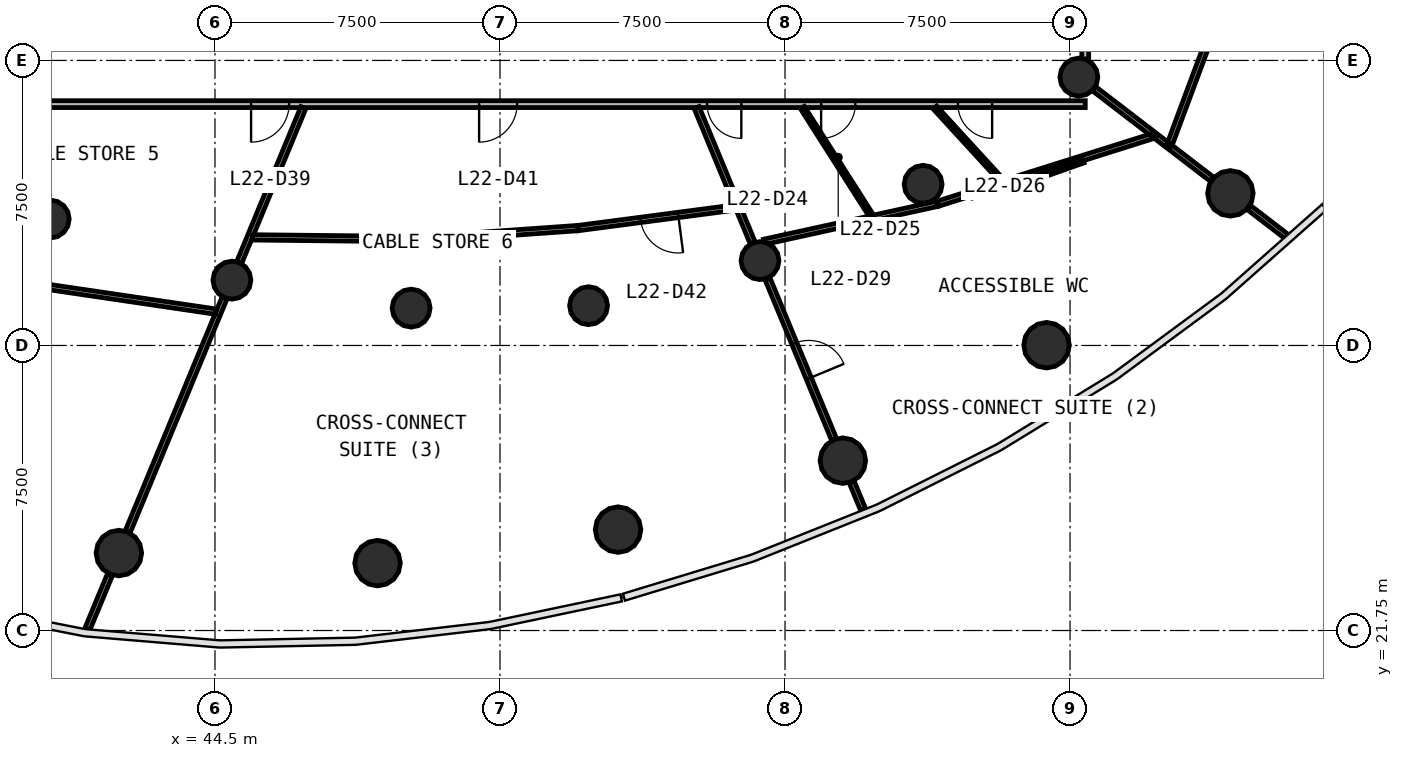
"""IFC4 building model, lengths in metres.
Left out: names, types, materials, properties, quantities, classifications, styles, units other than length and angle.
Written with IfcOpenShell. Run it as: python <this file> out.ifc"""

import sys

from ifc_helpers import new_model, si_unit, direction, frame, frame_2d, origin, origin_2d, place, context, subcontext, project, spatial, rectangle, circle, extrude, source, transform, mapped, element, fill, save


model = new_model("IFC4")
c1 = context("Model", 3, precision=1e-05, world=origin(), true_north=direction((0.0, 1.0)))
c2 = subcontext(c1, "Body", "Model", "MODEL_VIEW")
j1 = project(units=[si_unit("LENGTHUNIT", "METRE"), si_unit("PLANEANGLEUNIT", "RADIAN")], contexts=[c1])
p1 = place(None, origin())
s1 = spatial("IfcSite", under=j1, at=p1, CompositionType="ELEMENT")
p2 = place(p1, origin())
s2 = spatial("IfcBuilding", under=s1, at=p2, CompositionType="ELEMENT")
p3 = place(p2, frame((0.0, 0.0, 96.2)))
s3 = spatial("IfcBuildingStorey", under=s2, at=p3, CompositionType="ELEMENT", Elevation=96.2)
m1 = source(origin(), c2, "Body", "SweptSolid", [
    extrude(circle(Radius=0.6, at=origin_2d()), origin(), (0.0, 0.0, 1.0), 4.1),
])
for number, where, z_axis, x_axis in (
    (1, (41.971, 23.788, 0.0), (0.0, 0.0, 1.0), (1.0, 0.0, 0.0)),
    (2, (48.778, 23.523, 0.0), (0.0, 0.0, 1.0), (1.0, 0.0, 0.0)),
    (3, (55.106, 24.405, 0.0), (0.0, 0.0, 1.0), (1.0, 0.0, 0.0)),
    (4, (61.022, 26.219, 0.0), (0.0, 0.0, 1.0), (1.0, 0.0, 0.0)),
    (5, (66.382, 29.257, 0.0), (0.0, 0.0, 1.0), (1.0, 0.0, 0.0)),
    (6, (71.22, 33.252, 0.0), (0.0, 0.0, 1.0), (1.0, 0.0, 0.0)),
):
    element("IfcColumn", number, at=place(p3, frame(where, z_axis=z_axis, x_axis=x_axis)), inside=s3, PredefinedType="COLUMN", context=c2, shape_type="MappedRepresentation", body=[
        mapped(m1, transform((0.0, 0.0, 0.0), scale=1.0)),
    ])
m2 = source(origin(), c2, "Body", "SweptSolid", [
    extrude(circle(Radius=0.5, at=origin_2d()), origin(), (0.0, 0.0, 1.0), 4.1),
])
for number, where, z_axis, x_axis in (
    (7, (40.165, 32.576, 0.0), (0.0, 0.0, 1.0), (1.0, 0.0, 0.0)),
    (8, (44.945, 30.969, 0.0), (0.0, 0.0, 1.0), (1.0, 0.0, 0.0)),
    (9, (49.661, 30.233, 0.0), (0.0, 0.0, 1.0), (1.0, 0.0, 0.0)),
    (10, (54.331, 30.297, 0.0), (0.0, 0.0, 1.0), (1.0, 0.0, 0.0)),
    (11, (58.842, 31.482, 0.0), (0.0, 0.0, 1.0), (1.0, 0.0, 0.0)),
    (12, (63.134, 33.49, 0.0), (0.0, 0.0, 1.0), (1.0, 0.0, 0.0)),
    (13, (67.232, 36.312, 0.0), (0.0, 0.0, 1.0), (1.0, 0.0, 0.0)),
):
    element("IfcColumn", number, at=place(p3, frame(where, z_axis=z_axis, x_axis=x_axis)), inside=s3, PredefinedType="COLUMN", context=c2, shape_type="MappedRepresentation", body=[
        mapped(m2, transform((0.0, 0.0, 0.0), scale=1.0)),
    ])
p4 = place(p3, frame((67.4, 35.6, 0.0), z_axis=(0.0, 0.0, 1.0), x_axis=(-1.0, 0.0, 0.0)))
e14 = element("IfcWall", 14, at=p4, inside=s3, PredefinedType="PARTITIONING", context=c2, shape_type="SweptSolid", body=[
    extrude(rectangle(XDim=30.8, YDim=0.18, at=frame_2d((15.4, 0.0))), origin(), (0.0, 0.0, 1.0), 2.9),
])
p5 = place(p4, frame((9.05, 0.0, 0.0)))
e15 = element("IfcOpeningElement", 15, at=p5, cuts=e14, PredefinedType="OPENING", context=c2, shape_type="SweptSolid", body=[
    extrude(rectangle(XDim=0.9, YDim=2.1, at=frame_2d((0.45, 1.05))), frame((0.0, 0.1, 0.0), z_axis=(0.0, -1.0, 0.0), x_axis=(1.0, 0.0, 0.0)), (0.0, 0.0, 1.0), 0.2),
])
p6 = place(p4, frame((6.05, 0.0, 0.0)))
e16 = element("IfcOpeningElement", 16, at=p6, cuts=e14, PredefinedType="OPENING", context=c2, shape_type="SweptSolid", body=[
    extrude(rectangle(XDim=0.9, YDim=2.1, at=frame_2d((0.45, 1.05))), frame((0.0, 0.1, 0.0), z_axis=(0.0, -1.0, 0.0), x_axis=(1.0, 0.0, 0.0)), (0.0, 0.0, 1.0), 0.2),
])
p7 = place(p4, frame((2.45, 0.0, 0.0)))
e17 = element("IfcOpeningElement", 17, at=p7, cuts=e14, PredefinedType="OPENING", context=c2, shape_type="SweptSolid", body=[
    extrude(rectangle(XDim=0.9, YDim=2.1, at=frame_2d((0.45, 1.05))), frame((0.0, 0.1, 0.0), z_axis=(0.0, -1.0, 0.0), x_axis=(1.0, 0.0, 0.0)), (0.0, 0.0, 1.0), 0.2),
])
p8 = place(p4, frame((20.95, 0.0, 0.0)))
e18 = element("IfcOpeningElement", 18, at=p8, cuts=e14, PredefinedType="OPENING", context=c2, shape_type="SweptSolid", body=[
    extrude(rectangle(XDim=1.0, YDim=2.1, at=frame_2d((0.5, 1.05))), frame((0.0, 0.1, 0.0), z_axis=(0.0, -1.0, 0.0), x_axis=(1.0, 0.0, 0.0)), (0.0, 0.0, 1.0), 0.2),
])
p9 = place(p4, frame((14.95, 0.0, 0.0)))
e19 = element("IfcOpeningElement", 19, at=p9, cuts=e14, PredefinedType="OPENING", context=c2, shape_type="SweptSolid", body=[
    extrude(rectangle(XDim=1.0, YDim=2.1, at=frame_2d((0.5, 1.05))), frame((0.0, 0.1, 0.0), z_axis=(0.0, -1.0, 0.0), x_axis=(1.0, 0.0, 0.0)), (0.0, 0.0, 1.0), 0.2),
])
p10 = place(p3, frame((67.4, 60.37, 0.0), z_axis=(0.0, 0.0, 1.0), x_axis=(0.0, -1.0, 0.0)))
e20 = element("IfcWall", 20, at=p10, inside=s3, PredefinedType="PARTITIONING", context=c2, shape_type="SweptSolid", body=[
    extrude(rectangle(XDim=23.583, YDim=0.18, at=frame_2d((11.791, 0.0))), origin(), (0.0, 0.0, 1.0), 2.9),
])
p11 = place(p10, frame((11.333, 0.0, 0.0)))
e21 = element("IfcOpeningElement", 21, at=p11, cuts=e20, PredefinedType="OPENING", context=c2, shape_type="SweptSolid", body=[
    extrude(rectangle(XDim=1.0, YDim=2.1, at=frame_2d((0.5, 1.05))), frame((0.0, 0.1, 0.0), z_axis=(0.0, -1.0, 0.0), x_axis=(1.0, 0.0, 0.0)), (0.0, 0.0, 1.0), 0.2),
])
p12 = place(p10, frame((4.532, 0.0, 0.0)))
e22 = element("IfcOpeningElement", 22, at=p12, cuts=e20, PredefinedType="OPENING", context=c2, shape_type="SweptSolid", body=[
    extrude(rectangle(XDim=1.0, YDim=2.1, at=frame_2d((0.5, 1.05))), frame((0.0, 0.1, 0.0), z_axis=(0.0, -1.0, 0.0), x_axis=(1.0, 0.0, 0.0)), (0.0, 0.0, 1.0), 0.2),
])
p13 = place(p3, frame((42.202, 24.347, 0.0), z_axis=(0.0, 0.0, 1.0), x_axis=(0.382696989205, 0.923873916968, 0.0)))
e23 = element("IfcWall", 23, at=p13, inside=s3, PredefinedType="PARTITIONING", context=c2, shape_type="SweptSolid", body=[
    extrude(rectangle(XDim=6.663, YDim=0.14, at=frame_2d((3.332, 0.0))), origin(), (0.0, 0.0, 1.0), 2.9),
])
p14 = place(p3, frame((63.525, 32.981, 0.0), z_axis=(0.0, 0.0, 1.0), x_axis=(0.953823490885, 0.300367688402, 0.0)))
e24 = element("IfcWall", 24, at=p14, inside=s3, PredefinedType="PARTITIONING", context=c2, shape_type="SweptSolid", body=[
    extrude(rectangle(XDim=5.983, YDim=0.14, at=frame_2d((2.992, 0.0))), origin(), (0.0, 0.0, 1.0), 2.9),
])
p15 = place(p3, frame((69.604, 34.492, 0.0), z_axis=(0.0, 0.0, 1.0), x_axis=(0.349032218766, 0.937110724655, 0.0)))
e25 = element("IfcWall", 25, at=p15, inside=s3, PredefinedType="PARTITIONING", context=c2, shape_type="SweptSolid", body=[
    extrude(rectangle(XDim=5.747, YDim=0.14, at=frame_2d((2.874, 0.0))), origin(), (0.0, 0.0, 1.0), 2.9),
])
p16 = place(p3, frame((38.958, 30.96, 0.0), z_axis=(0.0, 0.0, 1.0), x_axis=(0.989308018388, -0.145841162756, 0.0)))
e26 = element("IfcWall", 26, at=p16, inside=s3, PredefinedType="PARTITIONING", context=c2, shape_type="SweptSolid", body=[
    extrude(rectangle(XDim=5.628, YDim=0.14, at=frame_2d((2.814, 0.0))), origin(), (0.0, 0.0, 1.0), 2.9),
])
p17 = place(p3, frame((58.947, 31.976, 0.0), z_axis=(0.0, 0.0, 1.0), x_axis=(0.976747556801, 0.214392654451, 0.0)))
e27 = element("IfcWall", 27, at=p17, inside=s3, PredefinedType="PARTITIONING", context=c2, shape_type="SweptSolid", body=[
    extrude(rectangle(XDim=4.656, YDim=0.14, at=frame_2d((2.328, 0.0))), origin(), (0.0, 0.0, 1.0), 2.9),
])
p18 = place(p3, frame((59.035, 31.016, 0.0), z_axis=(0.0, 0.0, 1.0), x_axis=(0.382705930348, -0.923870213221, 0.0)))
e28 = element("IfcWall", 28, at=p18, inside=s3, PredefinedType="PARTITIONING", context=c2, shape_type="SweptSolid", body=[
    extrude(rectangle(XDim=4.587, YDim=0.14, at=frame_2d((2.293, 0.0))), origin(), (0.0, 0.0, 1.0), 2.9),
])
p19 = place(p18, frame((1.85, 0.0, 0.0)))
e29 = element("IfcOpeningElement", 29, at=p19, cuts=e28, PredefinedType="OPENING", context=c2, shape_type="SweptSolid", body=[
    extrude(rectangle(XDim=1.0, YDim=2.1, at=frame_2d((0.5, 1.05))), frame((0.0, 0.08, 0.0), z_axis=(0.0, -1.0, 0.0), x_axis=(1.0, 0.0, 0.0)), (0.0, 0.0, 1.0), 0.16),
])
p20 = place(p3, frame((45.139, 31.435, 0.0), z_axis=(0.0, 0.0, 1.0), x_axis=(0.382672831764, 0.923883923353, 0.0)))
e30 = element("IfcWall", 30, at=p20, inside=s3, PredefinedType="PARTITIONING", context=c2, shape_type="SweptSolid", body=[
    extrude(rectangle(XDim=4.41, YDim=0.14, at=frame_2d((2.205, 0.0))), origin(), (0.0, 0.0, 1.0), 2.9),
])
p21 = place(p3, frame((45.487, 32.094, 0.0), z_axis=(0.0, 0.0, 1.0), x_axis=(0.999942985282, -0.010678304441, 0.0)))
e31 = element("IfcWall", 31, at=p21, inside=s3, PredefinedType="PARTITIONING", context=c2, shape_type="SweptSolid", body=[
    extrude(rectangle(XDim=4.413, YDim=0.14, at=frame_2d((2.206, 0.0))), origin(), (0.0, 0.0, 1.0), 2.9),
])
p22 = place(p3, frame((58.259, 32.89, 0.0), z_axis=(0.0, 0.0, 1.0), x_axis=(-0.991506238872, -0.130059133771, 0.0)))
e32 = element("IfcWall", 32, at=p22, inside=s3, PredefinedType="PARTITIONING", context=c2, shape_type="SweptSolid", body=[
    extrude(rectangle(XDim=4.233, YDim=0.14, at=frame_2d((2.116, 0.0))), origin(), (0.0, 0.0, 1.0), 2.9),
])
p23 = place(p22, frame((1.583, 0.0, 0.0)))
e33 = element("IfcOpeningElement", 33, at=p23, cuts=e32, PredefinedType="OPENING", context=c2, shape_type="SweptSolid", body=[
    extrude(rectangle(XDim=1.0, YDim=2.1, at=frame_2d((0.5, 1.05))), frame((0.0, 0.08, 0.0), z_axis=(0.0, -1.0, 0.0), x_axis=(1.0, 0.0, 0.0)), (0.0, 0.0, 1.0), 0.16),
])
p24 = place(p3, frame((49.93, 32.049, 0.0), z_axis=(0.0, 0.0, 1.0), x_axis=(0.997534964588, 0.070171179441, 0.0)))
e34 = element("IfcWall", 34, at=p24, inside=s3, PredefinedType="PARTITIONING", context=c2, shape_type="SweptSolid", body=[
    extrude(rectangle(XDim=4.113, YDim=0.14, at=frame_2d((2.056, 0.0))), origin(), (0.0, 0.0, 1.0), 2.9),
])
p25 = place(p3, frame((57.174, 35.51, 0.0), z_axis=(0.0, 0.0, 1.0), x_axis=(0.382695087151, -0.923874704855, 0.0)))
e35 = element("IfcWall", 35, at=p25, inside=s3, PredefinedType="PARTITIONING", context=c2, shape_type="SweptSolid", body=[
    extrude(rectangle(XDim=2.764, YDim=0.14, at=frame_2d((1.382, 0.0))), origin(), (0.0, 0.0, 1.0), 2.9),
])
p26 = place(p3, frame((69.255, 34.76, 0.0), z_axis=(0.0, 0.0, 1.0), x_axis=(0.793638535871, -0.608389574517, 0.0)))
e36 = element("IfcWall", 36, at=p26, inside=s3, PredefinedType="PARTITIONING", context=c2, shape_type="SweptSolid", body=[
    extrude(rectangle(XDim=0.366, YDim=0.14, at=frame_2d((0.183, 0.0))), origin(), (0.0, 0.0, 1.0), 2.9),
])
p27 = place(p3, frame((67.633, 36.005, 0.0), z_axis=(0.0, 0.0, 1.0), x_axis=(0.793347691058, -0.608768791161, 0.0)))
e37 = element("IfcWall", 37, at=p27, inside=s3, PredefinedType="PARTITIONING", context=c2, shape_type="SweptSolid", body=[
    extrude(rectangle(XDim=1.93, YDim=0.14, at=frame_2d((0.965, 0.0))), origin(), (0.0, 0.0, 1.0), 2.9),
])
p28 = place(p3, frame((69.628, 34.474, 0.0), z_axis=(0.0, 0.0, 1.0), x_axis=(0.793412961963, -0.608683720654, 0.0)))
e38 = element("IfcWall", 38, at=p28, inside=s3, PredefinedType="PARTITIONING", context=c2, shape_type="SweptSolid", body=[
    extrude(rectangle(XDim=1.402, YDim=0.14, at=frame_2d((0.701, 0.0))), origin(), (0.0, 0.0, 1.0), 2.9),
])
p29 = place(p3, frame((41.74, 23.229, 0.0), z_axis=(0.0, 0.0, 1.0), x_axis=(-0.38270777603, -0.923869448659, 0.0)))
e39 = element("IfcWall", 39, at=p29, inside=s3, PredefinedType="PARTITIONING", context=c2, shape_type="SweptSolid", body=[
    extrude(rectangle(XDim=1.555, YDim=0.14, at=frame_2d((0.777, 0.0))), origin(), (0.0, 0.0, 1.0), 2.9),
])
p30 = place(p3, frame((71.699, 32.884, 0.0), z_axis=(0.0, 0.0, 1.0), x_axis=(0.793289842444, -0.60884417208, 0.0)))
e40 = element("IfcWall", 40, at=p30, inside=s3, PredefinedType="PARTITIONING", context=c2, shape_type="SweptSolid", body=[
    extrude(rectangle(XDim=1.267, YDim=0.14, at=frame_2d((0.633, 0.0))), origin(), (0.0, 0.0, 1.0), 2.9),
])
p31 = place(p3, frame((58.27, 32.862, 0.0), z_axis=(0.0, 0.0, 1.0), x_axis=(0.382649964745, -0.923893394543, 0.0)))
e41 = element("IfcWall", 41, at=p31, inside=s3, PredefinedType="PARTITIONING", context=c2, shape_type="SweptSolid", body=[
    extrude(rectangle(XDim=0.988, YDim=0.14, at=frame_2d((0.494, 0.0))), origin(), (0.0, 0.0, 1.0), 2.9),
])
p32 = place(p3, frame((61.253, 25.66, 0.0), z_axis=(0.0, 0.0, 1.0), x_axis=(0.382766463222, -0.923845135633, 0.0)))
e42 = element("IfcWall", 42, at=p32, inside=s3, PredefinedType="PARTITIONING", context=c2, shape_type="SweptSolid", body=[
    extrude(rectangle(XDim=0.797, YDim=0.14, at=frame_2d((0.399, 0.0))), origin(), (0.0, 0.0, 1.0), 2.9),
])
p33 = place(p3, frame((65.368, 33.411, 0.0), z_axis=(0.0, 0.0, 1.0), x_axis=(0.942711024934, 0.33361043669, 0.0)))
e43 = element("IfcWall", 43, at=p33, inside=s3, PredefinedType="PARTITIONING", context=c2, shape_type="SweptSolid", body=[
    extrude(rectangle(XDim=2.1, YDim=0.12, at=frame_2d((1.05, 0.0))), origin(), (0.0, 0.0, 1.0), 2.9),
])
p34 = place(p3, frame((59.957, 35.51, 0.0), z_axis=(0.0, 0.0, 1.0), x_axis=(0.537315929202, -0.84338104806, 0.0)))
e44 = element("IfcWall", 44, at=p34, inside=s3, PredefinedType="PARTITIONING", context=c2, shape_type="SweptSolid", body=[
    extrude(rectangle(XDim=3.371, YDim=0.12, at=frame_2d((1.686, 0.0))), origin(), (0.0, 0.0, 1.0), 2.9),
])
p35 = place(p3, frame((63.445, 35.51, 0.0), z_axis=(0.0, 0.0, 1.0), x_axis=(0.675580671641, -0.737286074808, 0.0)))
e45 = element("IfcWall", 45, at=p35, inside=s3, PredefinedType="PARTITIONING", context=c2, shape_type="SweptSolid", body=[
    extrude(rectangle(XDim=2.611, YDim=0.12, at=frame_2d((1.306, 0.0))), origin(), (0.0, 0.0, 1.0), 2.9),
])
p36 = place(p3, frame((64.423, 33.19, 0.0), z_axis=(0.0, 0.0, 1.0), x_axis=(0.973868006814, 0.227114740395, 0.0)))
e46 = element("IfcWall", 46, at=p36, inside=s3, PredefinedType="PARTITIONING", context=c2, shape_type="SweptSolid", body=[
    extrude(rectangle(XDim=0.941, YDim=0.12, at=frame_2d((0.47, 0.0))), origin(), (0.0, 0.0, 1.0), 2.9),
])
m3 = source(origin(), c2, "Body", "SweptSolid", [
    extrude(rectangle(XDim=0.9, YDim=2.1, at=frame_2d((0.45, 1.05))), frame((0.0, 0.025, 0.0), z_axis=(0.0, -1.0, 0.0), x_axis=(1.0, 0.0, 0.0)), (0.0, 0.0, 1.0), 0.05),
])
p37 = place(p5, origin())
e47 = element("IfcDoor", 47, at=p37, inside=s3, OperationType="SINGLE_SWING_LEFT", PredefinedType="DOOR", context=c2, shape_type="MappedRepresentation", body=[
    mapped(m3, transform((0.0, 0.0, 0.0), scale=1.0)),
])
fill(e15, e47)
p38 = place(p6, origin())
e48 = element("IfcDoor", 48, at=p38, inside=s3, OperationType="SINGLE_SWING_RIGHT", PredefinedType="DOOR", context=c2, shape_type="MappedRepresentation", body=[
    mapped(m3, transform((0.0, 0.0, 0.0), scale=1.0)),
])
fill(e16, e48)
p39 = place(p7, origin())
e49 = element("IfcDoor", 49, at=p39, inside=s3, OperationType="SINGLE_SWING_LEFT", PredefinedType="DOOR", context=c2, shape_type="MappedRepresentation", body=[
    mapped(m3, transform((0.0, 0.0, 0.0), scale=1.0)),
])
fill(e17, e49)
m4 = source(origin(), c2, "Body", "SweptSolid", [
    extrude(rectangle(XDim=1.0, YDim=2.1, at=frame_2d((0.5, 1.05))), frame((0.0, 0.025, 0.0), z_axis=(0.0, -1.0, 0.0), x_axis=(1.0, 0.0, 0.0)), (0.0, 0.0, 1.0), 0.05),
])
p40 = place(p19, origin())
e50 = element("IfcDoor", 50, at=p40, inside=s3, OperationType="SINGLE_SWING_RIGHT", PredefinedType="DOOR", context=c2, shape_type="MappedRepresentation", body=[
    mapped(m4, transform((0.0, 0.0, 0.0), scale=1.0)),
])
fill(e29, e50)
p41 = place(p8, origin())
e51 = element("IfcDoor", 51, at=p41, inside=s3, OperationType="SINGLE_SWING_RIGHT", PredefinedType="DOOR", context=c2, shape_type="MappedRepresentation", body=[
    mapped(m4, transform((0.0, 0.0, 0.0), scale=1.0)),
])
fill(e18, e51)
p42 = place(p9, origin())
e52 = element("IfcDoor", 52, at=p42, inside=s3, OperationType="SINGLE_SWING_RIGHT", PredefinedType="DOOR", context=c2, shape_type="MappedRepresentation", body=[
    mapped(m4, transform((0.0, 0.0, 0.0), scale=1.0)),
])
fill(e19, e52)
p43 = place(p23, origin())
e53 = element("IfcDoor", 53, at=p43, inside=s3, OperationType="SINGLE_SWING_LEFT", PredefinedType="DOOR", context=c2, shape_type="MappedRepresentation", body=[
    mapped(m4, transform((0.0, 0.0, 0.0), scale=1.0)),
])
fill(e33, e53)
save(model, sys.argv[1])
